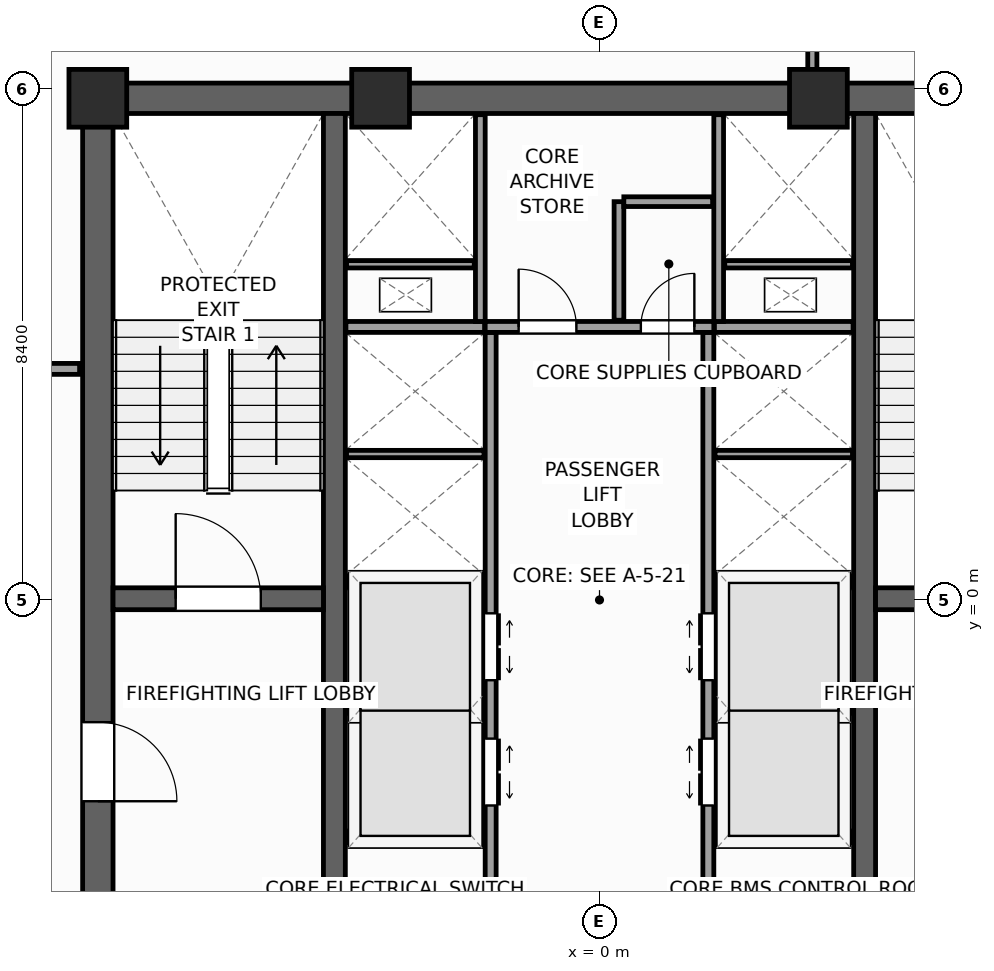
"""IFC4 building model, lengths in metres.
Left out: names, types, materials, properties, quantities, classifications, styles, units other than length and angle.
Written with IfcOpenShell. Run it as: python <this file> out.ifc"""

import sys

from ifc_helpers import new_model, si_unit, direction, frame, frame_2d, origin, origin_2d, place, context, subcontext, project, spatial, rectangle, extrude, source, transform, mapped, element, fill, save


model = new_model("IFC4")
c1 = context("Model", 3, precision=1e-05, world=origin(), true_north=direction((0.0, 1.0)))
c2 = subcontext(c1, "Body", "Model", "MODEL_VIEW")
j1 = project(units=[si_unit("LENGTHUNIT", "METRE"), si_unit("PLANEANGLEUNIT", "RADIAN")], contexts=[c1])
p1 = place(None, origin())
s1 = spatial("IfcSite", under=j1, at=p1, CompositionType="ELEMENT")
p2 = place(p1, origin())
s2 = spatial("IfcBuilding", under=s1, at=p2, CompositionType="ELEMENT")
p3 = place(p2, frame((0.0, 0.0, 225.1)))
s3 = spatial("IfcBuildingStorey", under=s2, at=p3, CompositionType="ELEMENT", Elevation=225.1)
p4 = place(p3, frame((-8.5, 8.25, 0.0), z_axis=(0.0, 0.0, 1.0), x_axis=(1.0, 0.0, 0.0)))
e1 = element("IfcWall", 1, at=p4, inside=s3, PredefinedType="SHEAR", context=c2, shape_type="SweptSolid", body=[
    extrude(rectangle(XDim=17.0, YDim=0.5, at=frame_2d((8.5, 0.0))), origin(), (0.0, 0.0, 1.0), 3.9),
])
p5 = place(p3, frame((-8.25, -8.0, 0.0), z_axis=(0.0, 0.0, 1.0), x_axis=(0.0, 1.0, 0.0)))
e2 = element("IfcWall", 2, at=p5, inside=s3, PredefinedType="SHEAR", context=c2, shape_type="SweptSolid", body=[
    extrude(rectangle(XDim=16.0, YDim=0.5, at=frame_2d((8.0, 0.0))), origin(), (0.0, 0.0, 1.0), 3.9),
])
p6 = place(p5, frame((4.69, 0.0, 0.0)))
e3 = element("IfcOpeningElement", 3, at=p6, cuts=e2, PredefinedType="OPENING", context=c2, shape_type="SweptSolid", body=[
    extrude(rectangle(XDim=1.3, YDim=2.2, at=frame_2d((0.65, 1.1))), frame((0.0, 0.26, 0.0), z_axis=(0.0, -1.0, 0.0), x_axis=(1.0, 0.0, 0.0)), (0.0, 0.0, 1.0), 0.52),
])
for number, where, z_axis, x_axis in (
    (4, (-4.36, -8.0, 0.0), (0.0, 0.0, 1.0), (0.0, 1.0, 0.0)),
    (5, (4.36, -8.0, 0.0), (0.0, 0.0, 1.0), (0.0, 1.0, 0.0)),
):
    element("IfcWall", number, at=place(p3, frame(where, z_axis=z_axis, x_axis=x_axis)), inside=s3, PredefinedType="SHEAR", context=c2, shape_type="SweptSolid", body=[
        extrude(rectangle(XDim=16.0, YDim=0.36, at=frame_2d((8.0, 0.0))), origin(), (0.0, 0.0, 1.0), 3.9),
    ])
p7 = place(p3, frame((-8.0, 0.02, 0.0), z_axis=(0.0, 0.0, 1.0), x_axis=(1.0, 0.0, 0.0)))
e6 = element("IfcWall", 6, at=p7, inside=s3, PredefinedType="SHEAR", context=c2, shape_type="SweptSolid", body=[
    extrude(rectangle(XDim=3.46, YDim=0.36, at=frame_2d((1.73, 0.0))), origin(), (0.0, 0.0, 1.0), 3.9),
])
p8 = place(p7, frame((1.03, 0.0, 0.0)))
e7 = element("IfcOpeningElement", 7, at=p8, cuts=e6, PredefinedType="OPENING", context=c2, shape_type="SweptSolid", body=[
    extrude(rectangle(XDim=1.4, YDim=2.2, at=frame_2d((0.7, 1.1))), frame((0.0, 0.19, 0.0), z_axis=(0.0, -1.0, 0.0), x_axis=(1.0, 0.0, 0.0)), (0.0, 0.0, 1.0), 0.38),
])
p9 = place(p3, frame((4.54, 0.02, 0.0), z_axis=(0.0, 0.0, 1.0), x_axis=(1.0, 0.0, 0.0)))
e8 = element("IfcWall", 8, at=p9, inside=s3, PredefinedType="SHEAR", context=c2, shape_type="SweptSolid", body=[
    extrude(rectangle(XDim=3.46, YDim=0.36, at=frame_2d((1.73, 0.0))), origin(), (0.0, 0.0, 1.0), 3.9),
])
p10 = place(p9, frame((1.03, 0.0, 0.0)))
e9 = element("IfcOpeningElement", 9, at=p10, cuts=e8, PredefinedType="OPENING", context=c2, shape_type="SweptSolid", body=[
    extrude(rectangle(XDim=1.4, YDim=2.2, at=frame_2d((0.7, 1.1))), frame((0.0, 0.19, 0.0), z_axis=(0.0, -1.0, 0.0), x_axis=(1.0, 0.0, 0.0)), (0.0, 0.0, 1.0), 0.38),
])
m1 = source(origin(), c2, "Body", "SweptSolid", [
    extrude(rectangle(XDim=0.95, YDim=0.95, at=origin_2d()), origin(), (0.0, 0.0, 1.0), 3.9),
])
for number, where, z_axis, x_axis in (
    (10, (-8.25, 8.25, 0.0), (0.0, 0.0, 1.0), (1.0, 0.0, 0.0)),
    (11, (-3.6, 8.25, 0.0), (0.0, 0.0, 1.0), (1.0, 0.0, 0.0)),
    (12, (3.6, 8.25, 0.0), (0.0, 0.0, 1.0), (1.0, 0.0, 0.0)),
):
    element("IfcColumn", number, at=place(p3, frame(where, z_axis=z_axis, x_axis=x_axis)), inside=s3, PredefinedType="PILASTER", context=c2, shape_type="MappedRepresentation", body=[
        mapped(m1, transform((0.0, 0.0, 0.0), scale=1.0)),
    ])
p11 = place(p3, frame((29.154, 6.733, 0.0), z_axis=(0.0, 0.0, 1.0), x_axis=(-0.77714192302, 0.629325378072, 0.0)))
e13 = element("IfcWall", 13, at=p11, inside=s3, PredefinedType="STANDARD", context=c2, shape_type="SweptSolid", body=[
    extrude(rectangle(XDim=36.84, YDim=0.34, at=frame_2d((18.42, 0.0))), origin(), (0.0, 0.0, 1.0), 2.96),
])
p12 = place(p11, frame((3.721, 0.0, 0.48)))
e14 = element("IfcOpeningElement", 14, at=p12, cuts=e13, PredefinedType="OPENING", context=c2, shape_type="SweptSolid", body=[
    extrude(rectangle(XDim=1.4, YDim=2.4, at=frame_2d((0.7, 1.2))), frame((0.0, 0.18, 0.0), z_axis=(0.0, -1.0, 0.0), x_axis=(1.0, 0.0, 0.0)), (0.0, 0.0, 1.0), 0.36),
])
p13 = place(p11, frame((9.809, 0.0, 0.58)))
e15 = element("IfcOpeningElement", 15, at=p13, cuts=e13, PredefinedType="OPENING", context=c2, shape_type="SweptSolid", body=[
    extrude(rectangle(XDim=1.75, YDim=2.3, at=frame_2d((0.875, 1.15))), frame((0.0, 0.18, 0.0), z_axis=(0.0, -1.0, 0.0), x_axis=(1.0, 0.0, 0.0)), (0.0, 0.0, 1.0), 0.36),
])
p14 = place(p11, frame((16.058, 0.0, 0.58)))
e16 = element("IfcOpeningElement", 16, at=p14, cuts=e13, PredefinedType="OPENING", context=c2, shape_type="SweptSolid", body=[
    extrude(rectangle(XDim=1.75, YDim=2.3, at=frame_2d((0.875, 1.15))), frame((0.0, 0.18, 0.0), z_axis=(0.0, -1.0, 0.0), x_axis=(1.0, 0.0, 0.0)), (0.0, 0.0, 1.0), 0.36),
])
p15 = place(p11, frame((24.176, 0.0, 0.58)))
e17 = element("IfcOpeningElement", 17, at=p15, cuts=e13, PredefinedType="OPENING", context=c2, shape_type="SweptSolid", body=[
    extrude(rectangle(XDim=1.75, YDim=2.3, at=frame_2d((0.875, 1.15))), frame((0.0, 0.18, 0.0), z_axis=(0.0, -1.0, 0.0), x_axis=(1.0, 0.0, 0.0)), (0.0, 0.0, 1.0), 0.36),
])
p16 = place(p11, frame((30.982, 0.0, 0.48)))
e18 = element("IfcOpeningElement", 18, at=p16, cuts=e13, PredefinedType="OPENING", context=c2, shape_type="SweptSolid", body=[
    extrude(rectangle(XDim=1.4, YDim=2.4, at=frame_2d((0.7, 1.2))), frame((0.0, 0.18, 0.0), z_axis=(0.0, -1.0, 0.0), x_axis=(1.0, 0.0, 0.0)), (0.0, 0.0, 1.0), 0.36),
])
p17 = place(p3, frame((-6.733, 29.154, 0.0), z_axis=(0.0, 0.0, 1.0), x_axis=(-0.629325378072, -0.77714192302, 0.0)))
e19 = element("IfcWall", 19, at=p17, inside=s3, PredefinedType="STANDARD", context=c2, shape_type="SweptSolid", body=[
    extrude(rectangle(XDim=36.84, YDim=0.34, at=frame_2d((18.42, 0.0))), origin(), (0.0, 0.0, 1.0), 2.96),
])
p18 = place(p17, frame((12.295, 0.0, 0.0)))
e20 = element("IfcOpeningElement", 20, at=p18, cuts=e19, PredefinedType="OPENING", context=c2, shape_type="SweptSolid", body=[
    extrude(rectangle(XDim=1.05, YDim=2.25, at=frame_2d((0.525, 1.125))), frame((0.0, 0.18, 0.0), z_axis=(0.0, -1.0, 0.0), x_axis=(1.0, 0.0, 0.0)), (0.0, 0.0, 1.0), 0.36),
])
p19 = place(p17, frame((3.721, 0.0, 0.48)))
e21 = element("IfcOpeningElement", 21, at=p19, cuts=e19, PredefinedType="OPENING", context=c2, shape_type="SweptSolid", body=[
    extrude(rectangle(XDim=1.4, YDim=2.4, at=frame_2d((0.7, 1.2))), frame((0.0, 0.18, 0.0), z_axis=(0.0, -1.0, 0.0), x_axis=(1.0, 0.0, 0.0)), (0.0, 0.0, 1.0), 0.36),
])
p20 = place(p17, frame((9.059, 0.0, 0.58)))
e22 = element("IfcOpeningElement", 22, at=p20, cuts=e19, PredefinedType="OPENING", context=c2, shape_type="SweptSolid", body=[
    extrude(rectangle(XDim=1.75, YDim=2.3, at=frame_2d((0.875, 1.15))), frame((0.0, 0.18, 0.0), z_axis=(0.0, -1.0, 0.0), x_axis=(1.0, 0.0, 0.0)), (0.0, 0.0, 1.0), 0.36),
])
p21 = place(p17, frame((16.058, 0.0, 0.58)))
e23 = element("IfcOpeningElement", 23, at=p21, cuts=e19, PredefinedType="OPENING", context=c2, shape_type="SweptSolid", body=[
    extrude(rectangle(XDim=1.75, YDim=2.3, at=frame_2d((0.875, 1.15))), frame((0.0, 0.18, 0.0), z_axis=(0.0, -1.0, 0.0), x_axis=(1.0, 0.0, 0.0)), (0.0, 0.0, 1.0), 0.36),
])
p22 = place(p17, frame((24.176, 0.0, 0.58)))
e24 = element("IfcOpeningElement", 24, at=p22, cuts=e19, PredefinedType="OPENING", context=c2, shape_type="SweptSolid", body=[
    extrude(rectangle(XDim=1.75, YDim=2.3, at=frame_2d((0.875, 1.15))), frame((0.0, 0.18, 0.0), z_axis=(0.0, -1.0, 0.0), x_axis=(1.0, 0.0, 0.0)), (0.0, 0.0, 1.0), 0.36),
])
p23 = place(p17, frame((30.232, 0.0, 0.48)))
e25 = element("IfcOpeningElement", 25, at=p23, cuts=e19, PredefinedType="OPENING", context=c2, shape_type="SweptSolid", body=[
    extrude(rectangle(XDim=1.4, YDim=2.4, at=frame_2d((0.7, 1.2))), frame((0.0, 0.18, 0.0), z_axis=(0.0, -1.0, 0.0), x_axis=(1.0, 0.0, 0.0)), (0.0, 0.0, 1.0), 0.36),
])
p24 = place(p3, frame((-1.79, -7.98, 0.0), z_axis=(0.0, 0.0, 1.0), x_axis=(0.0, 1.0, 0.0)))
e26 = element("IfcWall", 26, at=p24, inside=s3, PredefinedType="PARTITIONING", context=c2, shape_type="SweptSolid", body=[
    extrude(rectangle(XDim=12.38, YDim=0.18, at=frame_2d((6.19, 0.0))), origin(), (0.0, 0.0, 1.0), 3.66),
])
p25 = place(p24, frame((4.6, 0.0, 0.0)))
e27 = element("IfcOpeningElement", 27, at=p25, cuts=e26, PredefinedType="OPENING", context=c2, shape_type="SweptSolid", body=[
    extrude(rectangle(XDim=1.1, YDim=2.2, at=frame_2d((0.55, 1.1))), frame((0.0, 0.1, 0.0), z_axis=(0.0, -1.0, 0.0), x_axis=(1.0, 0.0, 0.0)), (0.0, 0.0, 1.0), 0.2),
])
p26 = place(p24, frame((6.66, 0.0, 0.0)))
e28 = element("IfcOpeningElement", 28, at=p26, cuts=e26, PredefinedType="OPENING", context=c2, shape_type="SweptSolid", body=[
    extrude(rectangle(XDim=1.1, YDim=2.2, at=frame_2d((0.55, 1.1))), frame((0.0, 0.1, 0.0), z_axis=(0.0, -1.0, 0.0), x_axis=(1.0, 0.0, 0.0)), (0.0, 0.0, 1.0), 0.2),
])
p27 = place(p24, frame((1.4, 0.0, 0.0)))
e29 = element("IfcOpeningElement", 29, at=p27, cuts=e26, PredefinedType="OPENING", context=c2, shape_type="SweptSolid", body=[
    extrude(rectangle(XDim=1.15, YDim=2.25, at=frame_2d((0.575, 1.125))), frame((0.0, 0.1, 0.0), z_axis=(0.0, -1.0, 0.0), x_axis=(1.0, 0.0, 0.0)), (0.0, 0.0, 1.0), 0.2),
])
p28 = place(p3, frame((1.79, -7.98, 0.0), z_axis=(0.0, 0.0, 1.0), x_axis=(0.0, 1.0, 0.0)))
e30 = element("IfcWall", 30, at=p28, inside=s3, PredefinedType="PARTITIONING", context=c2, shape_type="SweptSolid", body=[
    extrude(rectangle(XDim=12.38, YDim=0.18, at=frame_2d((6.19, 0.0))), origin(), (0.0, 0.0, 1.0), 3.66),
])
p29 = place(p28, frame((4.6, 0.0, 0.0)))
e31 = element("IfcOpeningElement", 31, at=p29, cuts=e30, PredefinedType="OPENING", context=c2, shape_type="SweptSolid", body=[
    extrude(rectangle(XDim=1.1, YDim=2.2, at=frame_2d((0.55, 1.1))), frame((0.0, 0.1, 0.0), z_axis=(0.0, -1.0, 0.0), x_axis=(1.0, 0.0, 0.0)), (0.0, 0.0, 1.0), 0.2),
])
p30 = place(p28, frame((6.66, 0.0, 0.0)))
e32 = element("IfcOpeningElement", 32, at=p30, cuts=e30, PredefinedType="OPENING", context=c2, shape_type="SweptSolid", body=[
    extrude(rectangle(XDim=1.1, YDim=2.2, at=frame_2d((0.55, 1.1))), frame((0.0, 0.1, 0.0), z_axis=(0.0, -1.0, 0.0), x_axis=(1.0, 0.0, 0.0)), (0.0, 0.0, 1.0), 0.2),
])
p31 = place(p28, frame((1.4, 0.0, 0.0)))
e33 = element("IfcOpeningElement", 33, at=p31, cuts=e30, PredefinedType="OPENING", context=c2, shape_type="SweptSolid", body=[
    extrude(rectangle(XDim=1.15, YDim=2.25, at=frame_2d((0.575, 1.125))), frame((0.0, 0.1, 0.0), z_axis=(0.0, -1.0, 0.0), x_axis=(1.0, 0.0, 0.0)), (0.0, 0.0, 1.0), 0.2),
])
p32 = place(p3, frame((-1.88, 4.49, 0.0), z_axis=(0.0, 0.0, 1.0), x_axis=(1.0, 0.0, 0.0)))
e34 = element("IfcWall", 34, at=p32, inside=s3, PredefinedType="PARTITIONING", context=c2, shape_type="SweptSolid", body=[
    extrude(rectangle(XDim=3.76, YDim=0.18, at=frame_2d((1.88, 0.0))), origin(), (0.0, 0.0, 1.0), 3.66),
])
p33 = place(p32, frame((0.55, 0.0, 0.0)))
e35 = element("IfcOpeningElement", 35, at=p33, cuts=e34, PredefinedType="OPENING", context=c2, shape_type="SweptSolid", body=[
    extrude(rectangle(XDim=0.95, YDim=2.1, at=frame_2d((0.475, 1.05))), frame((0.0, 0.1, 0.0), z_axis=(0.0, -1.0, 0.0), x_axis=(1.0, 0.0, 0.0)), (0.0, 0.0, 1.0), 0.2),
])
p34 = place(p32, frame((2.56, 0.0, 0.0)))
e36 = element("IfcOpeningElement", 36, at=p34, cuts=e34, PredefinedType="OPENING", context=c2, shape_type="SweptSolid", body=[
    extrude(rectangle(XDim=0.88, YDim=2.1, at=frame_2d((0.44, 1.05))), frame((0.0, 0.1, 0.0), z_axis=(0.0, -1.0, 0.0), x_axis=(1.0, 0.0, 0.0)), (0.0, 0.0, 1.0), 0.2),
])
for number, where, z_axis, x_axis in (
    (37, (-4.17, -3.9, 0.0), (0.0, 0.0, 1.0), (1.0, 0.0, 0.0)),
    (38, (1.89, -3.9, 0.0), (0.0, 0.0, 1.0), (1.0, 0.0, 0.0)),
    (39, (-4.17, 0.3, 0.0), (0.0, 0.0, 1.0), (1.0, 0.0, 0.0)),
    (40, (1.89, 0.3, 0.0), (0.0, 0.0, 1.0), (1.0, 0.0, 0.0)),
    (41, (-4.17, 4.49, 0.0), (0.0, 0.0, 1.0), (1.0, 0.0, 0.0)),
    (42, (1.89, 4.49, 0.0), (0.0, 0.0, 1.0), (1.0, 0.0, 0.0)),
):
    element("IfcWall", number, at=place(p3, frame(where, z_axis=z_axis, x_axis=x_axis)), inside=s3, PredefinedType="PARTITIONING", context=c2, shape_type="SweptSolid", body=[
        extrude(rectangle(XDim=2.28, YDim=0.18, at=frame_2d((1.14, 0.0))), origin(), (0.0, 0.0, 1.0), 3.66),
    ])
for number, where, z_axis, x_axis in (
    (43, (-4.16, -1.8, 0.0), (0.0, 0.0, 1.0), (1.0, 0.0, 0.0)),
    (44, (1.9, -1.8, 0.0), (0.0, 0.0, 1.0), (1.0, 0.0, 0.0)),
    (45, (-4.16, 2.4, 0.0), (0.0, 0.0, 1.0), (1.0, 0.0, 0.0)),
    (46, (1.9, 2.4, 0.0), (0.0, 0.0, 1.0), (1.0, 0.0, 0.0)),
):
    element("IfcWall", number, at=place(p3, frame(where, z_axis=z_axis, x_axis=x_axis)), inside=s3, PredefinedType="PARTITIONING", context=c2, shape_type="SweptSolid", body=[
        extrude(rectangle(XDim=2.26, YDim=0.12, at=frame_2d((1.13, 0.0))), origin(), (0.0, 0.0, 1.0), 3.66),
    ])
for number, where, z_axis, x_axis in (
    (47, (-1.96, 4.58, 0.0), (0.0, 0.0, 1.0), (0.0, 1.0, 0.0)),
    (48, (1.96, 4.58, 0.0), (0.0, 0.0, 1.0), (0.0, 1.0, 0.0)),
):
    element("IfcWall", number, at=place(p3, frame(where, z_axis=z_axis, x_axis=x_axis)), inside=s3, PredefinedType="PARTITIONING", context=c2, shape_type="SweptSolid", body=[
        extrude(rectangle(XDim=3.4, YDim=0.16, at=frame_2d((1.7, 0.0))), origin(), (0.0, 0.0, 1.0), 3.66),
    ])
for number, where, z_axis, x_axis in (
    (49, (-4.16, 5.52, 0.0), (0.0, 0.0, 1.0), (1.0, 0.0, 0.0)),
    (50, (2.06, 5.52, 0.0), (0.0, 0.0, 1.0), (1.0, 0.0, 0.0)),
):
    element("IfcWall", number, at=place(p3, frame(where, z_axis=z_axis, x_axis=x_axis)), inside=s3, PredefinedType="PARTITIONING", context=c2, shape_type="SweptSolid", body=[
        extrude(rectangle(XDim=2.1, YDim=0.12, at=frame_2d((1.05, 0.0))), origin(), (0.0, 0.0, 1.0), 3.66),
    ])
p35 = place(p3, frame((0.32, 4.6, 0.0), z_axis=(0.0, 0.0, 1.0), x_axis=(0.0, 1.0, 0.0)))
e51 = element("IfcWall", 51, at=p35, inside=s3, PredefinedType="PARTITIONING", context=c2, shape_type="SweptSolid", body=[
    extrude(rectangle(XDim=1.95, YDim=0.16, at=frame_2d((0.975, 0.0))), origin(), (0.0, 0.0, 1.0), 3.66),
])
p36 = place(p3, frame((0.4, 6.55, 0.0), z_axis=(0.0, 0.0, 1.0), x_axis=(1.0, 0.0, 0.0)))
e52 = element("IfcWall", 52, at=p36, inside=s3, PredefinedType="PARTITIONING", context=c2, shape_type="SweptSolid", body=[
    extrude(rectangle(XDim=1.46, YDim=0.16, at=frame_2d((0.73, 0.0))), origin(), (0.0, 0.0, 1.0), 3.66),
])
p37 = place(p3, frame((-12.45, 3.8, 0.0), z_axis=(0.0, 0.0, 1.0), x_axis=(1.0, 0.0, 0.0)))
e53 = element("IfcWall", 53, at=p37, inside=s3, PredefinedType="PARTITIONING", context=c2, shape_type="SweptSolid", body=[
    extrude(rectangle(XDim=3.9, YDim=0.18, at=frame_2d((1.95, 0.0))), origin(), (0.0, 0.0, 1.0), 3.66),
])
p38 = place(p37, frame((1.4, 0.0, 0.0)))
e54 = element("IfcOpeningElement", 54, at=p38, cuts=e53, PredefinedType="OPENING", context=c2, shape_type="SweptSolid", body=[
    extrude(rectangle(XDim=1.1, YDim=2.2, at=frame_2d((0.55, 1.1))), frame((0.0, 0.1, 0.0), z_axis=(0.0, -1.0, 0.0), x_axis=(1.0, 0.0, 0.0)), (0.0, 0.0, 1.0), 0.2),
])
p39 = place(p3, frame((3.5, 8.505, 0.0), z_axis=(0.0, 0.0, 1.0), x_axis=(0.0, 1.0, 0.0)))
e55 = element("IfcWall", 55, at=p39, inside=s3, PredefinedType="PARTITIONING", context=c2, shape_type="SweptSolid", body=[
    extrude(rectangle(XDim=18.868, YDim=0.15, at=frame_2d((9.434, 0.0))), origin(), (0.0, 0.0, 1.0), 3.66),
])
m2 = source(origin(), c2, "Body", "SweptSolid", [
    extrude(rectangle(XDim=1.4, YDim=2.2, at=frame_2d((0.7, 1.1))), frame((0.0, 0.025, 0.0), z_axis=(0.0, -1.0, 0.0), x_axis=(1.0, 0.0, 0.0)), (0.0, 0.0, 1.0), 0.05),
])
p40 = place(p8, origin())
e56 = element("IfcDoor", 56, at=p40, inside=s3, OperationType="SINGLE_SWING_LEFT", PredefinedType="DOOR", context=c2, shape_type="MappedRepresentation", body=[
    mapped(m2, transform((0.0, 0.0, 0.0), scale=1.0)),
])
fill(e7, e56)
m3 = source(origin(), c2, "Body", "SweptSolid", [
    extrude(rectangle(XDim=1.3, YDim=2.2, at=frame_2d((0.65, 1.1))), frame((0.0, 0.025, 0.0), z_axis=(0.0, -1.0, 0.0), x_axis=(1.0, 0.0, 0.0)), (0.0, 0.0, 1.0), 0.05),
])
p41 = place(p6, frame((1.3, 0.0, 0.0), z_axis=(0.0, 0.0, 1.0), x_axis=(-1.0, 0.0, 0.0)))
e57 = element("IfcDoor", 57, at=p41, inside=s3, OperationType="SINGLE_SWING_LEFT", PredefinedType="DOOR", context=c2, shape_type="MappedRepresentation", body=[
    mapped(m3, transform((0.0, 0.0, 0.0), scale=1.0)),
])
fill(e3, e57)
m4 = source(origin(), c2, "Body", "SweptSolid", [
    extrude(rectangle(XDim=1.1, YDim=2.2, at=frame_2d((0.55, 1.1))), frame((0.0, 0.025, 0.0), z_axis=(0.0, -1.0, 0.0), x_axis=(1.0, 0.0, 0.0)), (0.0, 0.0, 1.0), 0.05),
])
p42 = place(p25, frame((1.1, 0.0, 0.0), z_axis=(0.0, 0.0, 1.0), x_axis=(-1.0, 0.0, 0.0)))
e58 = element("IfcDoor", 58, at=p42, inside=s3, OperationType="DOUBLE_DOOR_SLIDING", PredefinedType="DOOR", context=c2, shape_type="MappedRepresentation", body=[
    mapped(m4, transform((0.0, 0.0, 0.0), scale=1.0)),
])
fill(e27, e58)
p43 = place(p26, frame((1.1, 0.0, 0.0), z_axis=(0.0, 0.0, 1.0), x_axis=(-1.0, 0.0, 0.0)))
e59 = element("IfcDoor", 59, at=p43, inside=s3, OperationType="DOUBLE_DOOR_SLIDING", PredefinedType="DOOR", context=c2, shape_type="MappedRepresentation", body=[
    mapped(m4, transform((0.0, 0.0, 0.0), scale=1.0)),
])
fill(e28, e59)
p44 = place(p29, origin())
e60 = element("IfcDoor", 60, at=p44, inside=s3, OperationType="DOUBLE_DOOR_SLIDING", PredefinedType="DOOR", context=c2, shape_type="MappedRepresentation", body=[
    mapped(m4, transform((0.0, 0.0, 0.0), scale=1.0)),
])
fill(e31, e60)
p45 = place(p30, origin())
e61 = element("IfcDoor", 61, at=p45, inside=s3, OperationType="DOUBLE_DOOR_SLIDING", PredefinedType="DOOR", context=c2, shape_type="MappedRepresentation", body=[
    mapped(m4, transform((0.0, 0.0, 0.0), scale=1.0)),
])
fill(e32, e61)
m5 = source(origin(), c2, "Body", "SweptSolid", [
    extrude(rectangle(XDim=0.95, YDim=2.1, at=frame_2d((0.475, 1.05))), frame((0.0, 0.025, 0.0), z_axis=(0.0, -1.0, 0.0), x_axis=(1.0, 0.0, 0.0)), (0.0, 0.0, 1.0), 0.05),
])
p46 = place(p33, origin())
e62 = element("IfcDoor", 62, at=p46, inside=s3, OperationType="SINGLE_SWING_LEFT", PredefinedType="DOOR", context=c2, shape_type="MappedRepresentation", body=[
    mapped(m5, transform((0.0, 0.0, 0.0), scale=1.0)),
])
fill(e35, e62)
m6 = source(origin(), c2, "Body", "SweptSolid", [
    extrude(rectangle(XDim=0.88, YDim=2.1, at=frame_2d((0.44, 1.05))), frame((0.0, 0.025, 0.0), z_axis=(0.0, -1.0, 0.0), x_axis=(1.0, 0.0, 0.0)), (0.0, 0.0, 1.0), 0.05),
])
p47 = place(p34, origin())
e63 = element("IfcDoor", 63, at=p47, inside=s3, OperationType="SINGLE_SWING_RIGHT", PredefinedType="DOOR", context=c2, shape_type="MappedRepresentation", body=[
    mapped(m6, transform((0.0, 0.0, 0.0), scale=1.0)),
])
fill(e36, e63)
save(model, sys.argv[1])
